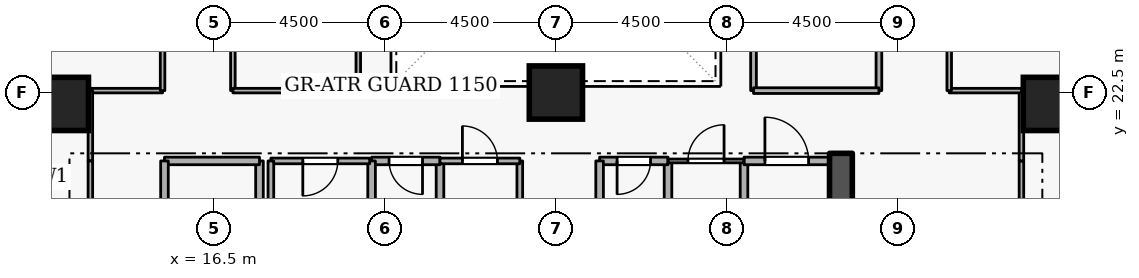
"""IFC4 building model, lengths in metres.
Left out: names, types, materials, properties, quantities, classifications, styles, units other than length and angle.
Written with IfcOpenShell. Run it as: python <this file> out.ifc"""

import sys

from ifc_helpers import new_model, si_unit, direction, frame, frame_2d, origin, origin_2d, place, context, subcontext, project, spatial, rectangle, extrude, element, fill, save


model = new_model("IFC4")
c1 = context("Model", 3, precision=1e-05, world=origin(), true_north=direction((0.0, 1.0)))
c2 = subcontext(c1, "Body", "Model", "MODEL_VIEW")
j1 = project(units=[si_unit("LENGTHUNIT", "METRE"), si_unit("PLANEANGLEUNIT", "RADIAN")], contexts=[c1])
p1 = place(None, origin())
s1 = spatial("IfcSite", under=j1, at=p1, CompositionType="ELEMENT")
p2 = place(p1, origin())
s2 = spatial("IfcBuilding", under=s1, at=p2, CompositionType="ELEMENT")
p3 = place(p2, frame((0.0, 0.0, 45.9)))
s3 = spatial("IfcBuildingStorey", under=s2, at=p3, CompositionType="ELEMENT", Elevation=45.9)
p4 = place(p3, frame((33.0, 15.2, 0.0), z_axis=(0.0, 0.0, 1.0), x_axis=(0.0, 1.0, 0.0)))
e1 = element("IfcWall", 1, at=p4, inside=s3, PredefinedType="SHEAR", context=c2, shape_type="SweptSolid", body=[
    extrude(rectangle(XDim=5.7, YDim=0.6, at=frame_2d((2.85, 0.0))), origin(), (0.0, 0.0, 1.0), 3.6),
])
for number, where, z_axis, x_axis in (
    (2, (12.5, 22.2, 0.0), (0.0, 0.0, 1.0), (1.0, 0.0, 0.0)),
    (3, (38.5, 22.2, 0.0), (0.0, 0.0, 1.0), (1.0, 0.0, 0.0)),
    (4, (25.5, 22.5, 0.0), (0.0, 0.0, 1.0), (1.0, 0.0, 0.0)),
):
    element("IfcColumn", number, at=place(p3, frame(where, z_axis=z_axis, x_axis=x_axis)), inside=s3, PredefinedType="COLUMN", context=c2, shape_type="SweptSolid", body=[
        extrude(rectangle(XDim=1.4, YDim=1.4, at=origin_2d()), origin(), (0.0, 0.0, 1.0), 3.6),
    ])
p5 = place(p3, frame((17.7, 18.4, 0.0), z_axis=(0.0, 0.0, 1.0), x_axis=(0.0, 1.0, 0.0)))
e5 = element("IfcWall", 5, at=p5, inside=s3, PredefinedType="STANDARD", context=c2, shape_type="SweptSolid", body=[
    extrude(rectangle(XDim=2.3, YDim=0.2, at=frame_2d((1.15, 0.0))), origin(), (0.0, 0.0, 1.0), 2.465),
])
p6 = place(p3, frame((17.7, 20.7, 0.0), z_axis=(0.0, 0.0, 1.0), x_axis=(-1.0, 0.0, 0.0)))
e6 = element("IfcWall", 6, at=p6, inside=s3, PredefinedType="STANDARD", context=c2, shape_type="SweptSolid", body=[
    extrude(rectangle(XDim=2.5, YDim=0.2, at=frame_2d((1.25, 0.0))), origin(), (0.0, 0.0, 1.0), 3.26),
])
p7 = place(p3, frame((15.2, 20.7, 0.0), z_axis=(0.0, 0.0, 1.0), x_axis=(0.0, -1.0, 0.0)))
e7 = element("IfcWall", 7, at=p7, inside=s3, PredefinedType="STANDARD", context=c2, shape_type="SweptSolid", body=[
    extrude(rectangle(XDim=5.7, YDim=0.2, at=frame_2d((2.85, 0.0))), origin(), (0.0, 0.0, 1.0), 3.26),
])
p8 = place(p7, frame((2.275, 0.0, 0.0)))
e8 = element("IfcOpeningElement", 8, at=p8, cuts=e7, PredefinedType="OPENING", context=c2, shape_type="SweptSolid", body=[
    extrude(rectangle(XDim=1.15, YDim=2.1, at=frame_2d((0.575, 1.05))), frame((0.0, 0.11, 0.0), z_axis=(0.0, -1.0, 0.0), x_axis=(1.0, 0.0, 0.0)), (0.0, 0.0, 1.0), 0.22),
])
p9 = place(p3, frame((28.45, 18.65, 0.0), z_axis=(0.0, 0.0, 1.0), x_axis=(0.0, 1.0, 0.0)))
e9 = element("IfcWall", 9, at=p9, inside=s3, PredefinedType="STANDARD", context=c2, shape_type="SweptSolid", body=[
    extrude(rectangle(XDim=2.05, YDim=0.2, at=frame_2d((1.025, 0.0))), origin(), (0.0, 0.0, 1.0), 3.26),
])
p10 = place(p3, frame((28.45, 20.7, 0.0), z_axis=(0.0, 0.0, 1.0), x_axis=(-1.0, 0.0, 0.0)))
e10 = element("IfcWall", 10, at=p10, inside=s3, PredefinedType="STANDARD", context=c2, shape_type="SweptSolid", body=[
    extrude(rectangle(XDim=1.8, YDim=0.2, at=frame_2d((0.9, 0.0))), origin(), (0.0, 0.0, 1.0), 3.26),
])
p11 = place(p10, frame((0.46, 0.0, 0.0)))
e11 = element("IfcOpeningElement", 11, at=p11, cuts=e10, PredefinedType="OPENING", context=c2, shape_type="SweptSolid", body=[
    extrude(rectangle(XDim=0.88, YDim=2.04, at=frame_2d((0.44, 1.02))), frame((0.0, 0.11, 0.0), z_axis=(0.0, -1.0, 0.0), x_axis=(1.0, 0.0, 0.0)), (0.0, 0.0, 1.0), 0.22),
])
for number, where, z_axis, x_axis in (
    (12, (26.65, 20.7, 0.0), (0.0, 0.0, 1.0), (0.0, -1.0, 0.0)),
    (13, (22.45, 18.65, 0.0), (0.0, 0.0, 1.0), (0.0, 1.0, 0.0)),
):
    element("IfcWall", number, at=place(p3, frame(where, z_axis=z_axis, x_axis=x_axis)), inside=s3, PredefinedType="STANDARD", context=c2, shape_type="SweptSolid", body=[
        extrude(rectangle(XDim=2.05, YDim=0.2, at=frame_2d((1.025, 0.0))), origin(), (0.0, 0.0, 1.0), 3.26),
    ])
p12 = place(p3, frame((22.45, 20.7, 0.0), z_axis=(0.0, 0.0, 1.0), x_axis=(-1.0, 0.0, 0.0)))
e14 = element("IfcWall", 14, at=p12, inside=s3, PredefinedType="STANDARD", context=c2, shape_type="SweptSolid", body=[
    extrude(rectangle(XDim=1.8, YDim=0.2, at=frame_2d((0.9, 0.0))), origin(), (0.0, 0.0, 1.0), 3.26),
])
p13 = place(p12, frame((0.46, 0.0, 0.0)))
e15 = element("IfcOpeningElement", 15, at=p13, cuts=e14, PredefinedType="OPENING", context=c2, shape_type="SweptSolid", body=[
    extrude(rectangle(XDim=0.88, YDim=2.04, at=frame_2d((0.44, 1.02))), frame((0.0, 0.11, 0.0), z_axis=(0.0, -1.0, 0.0), x_axis=(1.0, 0.0, 0.0)), (0.0, 0.0, 1.0), 0.22),
])
for number, where, z_axis, x_axis in (
    (16, (20.65, 20.7, 0.0), (0.0, 0.0, 1.0), (0.0, -1.0, 0.0)),
    (17, (30.45, 18.65, 0.0), (0.0, 0.0, 1.0), (0.0, 1.0, 0.0)),
):
    element("IfcWall", number, at=place(p3, frame(where, z_axis=z_axis, x_axis=x_axis)), inside=s3, PredefinedType="STANDARD", context=c2, shape_type="SweptSolid", body=[
        extrude(rectangle(XDim=2.05, YDim=0.2, at=frame_2d((1.025, 0.0))), origin(), (0.0, 0.0, 1.0), 3.26),
    ])
p14 = place(p3, frame((30.45, 20.7, 0.0), z_axis=(0.0, 0.0, 1.0), x_axis=(1.0, 0.0, 0.0)))
e18 = element("IfcWall", 18, at=p14, inside=s3, PredefinedType="STANDARD", context=c2, shape_type="SweptSolid", body=[
    extrude(rectangle(XDim=2.25, YDim=0.2, at=frame_2d((1.125, 0.0))), origin(), (0.0, 0.0, 1.0), 3.26),
])
p15 = place(p14, frame((0.55, 0.0, 0.0)))
e19 = element("IfcOpeningElement", 19, at=p15, cuts=e18, PredefinedType="OPENING", context=c2, shape_type="SweptSolid", body=[
    extrude(rectangle(XDim=1.15, YDim=2.1, at=frame_2d((0.575, 1.05))), frame((0.0, 0.11, 0.0), z_axis=(0.0, -1.0, 0.0), x_axis=(1.0, 0.0, 0.0)), (0.0, 0.0, 1.0), 0.22),
])
p16 = place(p3, frame((20.6, 20.7, 0.0), z_axis=(0.0, 0.0, 1.0), x_axis=(-1.0, 0.0, 0.0)))
e20 = element("IfcWall", 20, at=p16, inside=s3, PredefinedType="PARTITIONING", context=c2, shape_type="SweptSolid", body=[
    extrude(rectangle(XDim=2.6, YDim=0.15, at=frame_2d((1.3, 0.0))), origin(), (0.0, 0.0, 1.0), 3.26),
])
p17 = place(p16, frame((0.84, 0.0, 0.0)))
e21 = element("IfcOpeningElement", 21, at=p17, cuts=e20, PredefinedType="OPENING", context=c2, shape_type="SweptSolid", body=[
    extrude(rectangle(XDim=0.92, YDim=2.08, at=frame_2d((0.46, 1.04))), frame((0.0, 0.085, 0.0), z_axis=(0.0, -1.0, 0.0), x_axis=(1.0, 0.0, 0.0)), (0.0, 0.0, 1.0), 0.17),
])
p18 = place(p3, frame((18.0, 20.7, 0.0), z_axis=(0.0, 0.0, 1.0), x_axis=(0.0, -1.0, 0.0)))
e22 = element("IfcWall", 22, at=p18, inside=s3, PredefinedType="PARTITIONING", context=c2, shape_type="SweptSolid", body=[
    extrude(rectangle(XDim=2.05, YDim=0.15, at=frame_2d((1.025, 0.0))), origin(), (0.0, 0.0, 1.0), 2.465),
])
p19 = place(p3, frame((24.55, 20.7, 0.0), z_axis=(0.0, 0.0, 1.0), x_axis=(0.0, -1.0, 0.0)))
e23 = element("IfcWall", 23, at=p19, inside=s3, PredefinedType="PARTITIONING", context=c2, shape_type="SweptSolid", body=[
    extrude(rectangle(XDim=2.05, YDim=0.15, at=frame_2d((1.025, 0.0))), origin(), (0.0, 0.0, 1.0), 3.26),
])
p20 = place(p3, frame((22.45, 20.7, 0.0), z_axis=(0.0, 0.0, 1.0), x_axis=(1.0, 0.0, 0.0)))
e24 = element("IfcWall", 24, at=p20, inside=s3, PredefinedType="PARTITIONING", context=c2, shape_type="SweptSolid", body=[
    extrude(rectangle(XDim=2.1, YDim=0.15, at=frame_2d((1.05, 0.0))), origin(), (0.0, 0.0, 1.0), 3.26),
])
p21 = place(p20, frame((0.59, 0.0, 0.0)))
e25 = element("IfcOpeningElement", 25, at=p21, cuts=e24, PredefinedType="OPENING", context=c2, shape_type="SweptSolid", body=[
    extrude(rectangle(XDim=0.92, YDim=2.08, at=frame_2d((0.46, 1.04))), frame((0.0, 0.085, 0.0), z_axis=(0.0, -1.0, 0.0), x_axis=(1.0, 0.0, 0.0)), (0.0, 0.0, 1.0), 0.17),
])
p22 = place(p3, frame((28.45, 20.7, 0.0), z_axis=(0.0, 0.0, 1.0), x_axis=(1.0, 0.0, 0.0)))
e26 = element("IfcWall", 26, at=p22, inside=s3, PredefinedType="PARTITIONING", context=c2, shape_type="SweptSolid", body=[
    extrude(rectangle(XDim=2.0, YDim=0.1, at=frame_2d((1.0, 0.0))), origin(), (0.0, 0.0, 1.0), 3.26),
])
p23 = place(p22, frame((0.525, 0.0, 0.0)))
e27 = element("IfcOpeningElement", 27, at=p23, cuts=e26, PredefinedType="OPENING", context=c2, shape_type="SweptSolid", body=[
    extrude(rectangle(XDim=0.95, YDim=2.1, at=frame_2d((0.475, 1.05))), frame((0.0, 0.06, 0.0), z_axis=(0.0, -1.0, 0.0), x_axis=(1.0, 0.0, 0.0)), (0.0, 0.0, 1.0), 0.12),
])
p24 = place(p3, frame((15.15, 22.55, 0.0), z_axis=(0.0, 0.0, 1.0), x_axis=(-1.0, 0.0, 0.0)))
e28 = element("IfcWall", 28, at=p24, inside=s3, PredefinedType="PARTITIONING", context=c2, shape_type="SweptSolid", body=[
    extrude(rectangle(XDim=1.9, YDim=0.12, at=frame_2d((0.95, 0.0))), origin(), (0.0, 0.0, 1.0), 3.26),
])
p25 = place(p3, frame((13.25, 22.55, 0.0), z_axis=(0.0, 0.0, 1.0), x_axis=(0.0, -1.0, 0.0)))
e29 = element("IfcWall", 29, at=p25, inside=s3, PredefinedType="PARTITIONING", context=c2, shape_type="SweptSolid", body=[
    extrude(rectangle(XDim=1.85, YDim=0.12, at=frame_2d((0.925, 0.0))), origin(), (0.0, 0.0, 1.0), 3.26),
])
p26 = place(p3, frame((13.25, 20.7, 0.0), z_axis=(0.0, 0.0, 1.0), x_axis=(0.0, -1.0, 0.0)))
e30 = element("IfcWall", 30, at=p26, inside=s3, PredefinedType="PARTITIONING", context=c2, shape_type="SweptSolid", body=[
    extrude(rectangle(XDim=9.35, YDim=0.12, at=frame_2d((4.675, 0.0))), origin(), (0.0, 0.0, 1.0), 3.26),
])
p27 = place(p26, frame((4.15, 0.0, 0.0)))
e31 = element("IfcOpeningElement", 31, at=p27, cuts=e30, PredefinedType="OPENING", context=c2, shape_type="SweptSolid", body=[
    extrude(rectangle(XDim=1.05, YDim=2.1, at=frame_2d((0.525, 1.05))), frame((0.0, 0.07, 0.0), z_axis=(0.0, -1.0, 0.0), x_axis=(1.0, 0.0, 0.0)), (0.0, 0.0, 1.0), 0.14),
])
p28 = place(p3, frame((15.15, 27.0, 0.0), z_axis=(0.0, 0.0, 1.0), x_axis=(0.0, -1.0, 0.0)))
e32 = element("IfcWall", 32, at=p28, inside=s3, PredefinedType="PARTITIONING", context=c2, shape_type="SweptSolid", body=[
    extrude(rectangle(XDim=4.45, YDim=0.12, at=frame_2d((2.225, 0.0))), origin(), (0.0, 0.0, 1.0), 3.26),
])
p29 = place(p3, frame((37.75, 17.55, 0.0), z_axis=(0.0, 0.0, 1.0), x_axis=(0.0, 1.0, 0.0)))
e33 = element("IfcWall", 33, at=p29, inside=s3, PredefinedType="PARTITIONING", context=c2, shape_type="SweptSolid", body=[
    extrude(rectangle(XDim=3.15, YDim=0.12, at=frame_2d((1.575, 0.0))), origin(), (0.0, 0.0, 1.0), 3.26),
])
p30 = place(p3, frame((37.75, 20.7, 0.0), z_axis=(0.0, 0.0, 1.0), x_axis=(0.0, 1.0, 0.0)))
e34 = element("IfcWall", 34, at=p30, inside=s3, PredefinedType="PARTITIONING", context=c2, shape_type="SweptSolid", body=[
    extrude(rectangle(XDim=1.85, YDim=0.12, at=frame_2d((0.925, 0.0))), origin(), (0.0, 0.0, 1.0), 3.26),
])
p31 = place(p3, frame((37.75, 22.55, 0.0), z_axis=(0.0, 0.0, 1.0), x_axis=(-1.0, 0.0, 0.0)))
e35 = element("IfcWall", 35, at=p31, inside=s3, PredefinedType="PARTITIONING", context=c2, shape_type="SweptSolid", body=[
    extrude(rectangle(XDim=1.9, YDim=0.12, at=frame_2d((0.95, 0.0))), origin(), (0.0, 0.0, 1.0), 3.26),
])
p32 = place(p3, frame((35.85, 22.55, 0.0), z_axis=(0.0, 0.0, 1.0), x_axis=(0.0, 1.0, 0.0)))
e36 = element("IfcWall", 36, at=p32, inside=s3, PredefinedType="PARTITIONING", context=c2, shape_type="SweptSolid", body=[
    extrude(rectangle(XDim=4.45, YDim=0.12, at=frame_2d((2.225, 0.0))), origin(), (0.0, 0.0, 1.0), 3.26),
])
p33 = place(p32, frame((1.7, 0.0, 0.0)))
e37 = element("IfcOpeningElement", 37, at=p33, cuts=e36, PredefinedType="OPENING", context=c2, shape_type="SweptSolid", body=[
    extrude(rectangle(XDim=1.05, YDim=2.1, at=frame_2d((0.525, 1.05))), frame((0.0, 0.07, 0.0), z_axis=(0.0, -1.0, 0.0), x_axis=(1.0, 0.0, 0.0)), (0.0, 0.0, 1.0), 0.14),
])
p34 = place(p3, frame((30.7, 22.55, 0.0), z_axis=(0.0, 0.0, 1.0), x_axis=(0.0, 1.0, 0.0)))
e38 = element("IfcWall", 38, at=p34, inside=s3, PredefinedType="PARTITIONING", context=c2, shape_type="SweptSolid", body=[
    extrude(rectangle(XDim=8.9, YDim=0.15, at=frame_2d((4.45, 0.0))), origin(), (0.0, 0.0, 1.0), 3.26),
])
p35 = place(p3, frame((34.0, 31.45, 0.0), z_axis=(0.0, 0.0, 1.0), x_axis=(0.0, -1.0, 0.0)))
e39 = element("IfcWall", 39, at=p35, inside=s3, PredefinedType="PARTITIONING", context=c2, shape_type="SweptSolid", body=[
    extrude(rectangle(XDim=8.9, YDim=0.15, at=frame_2d((4.45, 0.0))), origin(), (0.0, 0.0, 1.0), 3.26),
])
p36 = place(p35, frame((2.48, 0.0, 0.0)))
e40 = element("IfcOpeningElement", 40, at=p36, cuts=e39, PredefinedType="OPENING", context=c2, shape_type="SweptSolid", body=[
    extrude(rectangle(XDim=1.3, YDim=2.12, at=frame_2d((0.65, 1.06))), frame((0.0, 0.085, 0.0), z_axis=(0.0, -1.0, 0.0), x_axis=(1.0, 0.0, 0.0)), (0.0, 0.0, 1.0), 0.17),
])
p37 = place(p3, frame((34.0, 22.55, 0.0), z_axis=(0.0, 0.0, 1.0), x_axis=(-1.0, 0.0, 0.0)))
e41 = element("IfcWall", 41, at=p37, inside=s3, PredefinedType="PARTITIONING", context=c2, shape_type="SweptSolid", body=[
    extrude(rectangle(XDim=3.3, YDim=0.15, at=frame_2d((1.65, 0.0))), origin(), (0.0, 0.0, 1.0), 3.26),
])
p38 = place(p3, frame((17.0, 22.55, 0.0), z_axis=(0.0, 0.0, 1.0), x_axis=(0.0, 1.0, 0.0)))
e42 = element("IfcWall", 42, at=p38, inside=s3, PredefinedType="PARTITIONING", context=c2, shape_type="SweptSolid", body=[
    extrude(rectangle(XDim=8.9, YDim=0.12, at=frame_2d((4.45, 0.0))), origin(), (0.0, 0.0, 1.0), 3.26),
])
p39 = place(p38, frame((3.975, 0.0, 0.0)))
e43 = element("IfcOpeningElement", 43, at=p39, cuts=e42, PredefinedType="OPENING", context=c2, shape_type="SweptSolid", body=[
    extrude(rectangle(XDim=0.95, YDim=2.1, at=frame_2d((0.475, 1.05))), frame((0.0, 0.07, 0.0), z_axis=(0.0, -1.0, 0.0), x_axis=(1.0, 0.0, 0.0)), (0.0, 0.0, 1.0), 0.14),
])
p40 = place(p3, frame((20.3, 31.45, 0.0), z_axis=(0.0, 0.0, 1.0), x_axis=(0.0, -1.0, 0.0)))
e44 = element("IfcWall", 44, at=p40, inside=s3, PredefinedType="PARTITIONING", context=c2, shape_type="SweptSolid", body=[
    extrude(rectangle(XDim=8.9, YDim=0.12, at=frame_2d((4.45, 0.0))), origin(), (0.0, 0.0, 1.0), 3.26),
])
p41 = place(p3, frame((20.3, 22.55, 0.0), z_axis=(0.0, 0.0, 1.0), x_axis=(-1.0, 0.0, 0.0)))
e45 = element("IfcWall", 45, at=p41, inside=s3, PredefinedType="PARTITIONING", context=c2, shape_type="SweptSolid", body=[
    extrude(rectangle(XDim=3.3, YDim=0.12, at=frame_2d((1.65, 0.0))), origin(), (0.0, 0.0, 1.0), 3.26),
])
p42 = place(p11, origin())
e46 = element("IfcDoor", 46, at=p42, inside=s3, OperationType="SINGLE_SWING_RIGHT", PredefinedType="DOOR", context=c2, shape_type="SweptSolid", body=[
    extrude(rectangle(XDim=0.88, YDim=2.04, at=frame_2d((0.44, 1.02))), frame((0.0, 0.025, 0.0), z_axis=(0.0, -1.0, 0.0), x_axis=(1.0, 0.0, 0.0)), (0.0, 0.0, 1.0), 0.05),
])
fill(e11, e46)
p43 = place(p13, origin())
e47 = element("IfcDoor", 47, at=p43, inside=s3, OperationType="SINGLE_SWING_LEFT", PredefinedType="DOOR", context=c2, shape_type="SweptSolid", body=[
    extrude(rectangle(XDim=0.88, YDim=2.04, at=frame_2d((0.44, 1.02))), frame((0.0, 0.025, 0.0), z_axis=(0.0, -1.0, 0.0), x_axis=(1.0, 0.0, 0.0)), (0.0, 0.0, 1.0), 0.05),
])
fill(e15, e47)
p44 = place(p17, origin())
e48 = element("IfcDoor", 48, at=p44, inside=s3, OperationType="SINGLE_SWING_RIGHT", PredefinedType="DOOR", context=c2, shape_type="SweptSolid", body=[
    extrude(rectangle(XDim=0.92, YDim=2.08, at=frame_2d((0.46, 1.04))), frame((0.0, 0.025, 0.0), z_axis=(0.0, -1.0, 0.0), x_axis=(1.0, 0.0, 0.0)), (0.0, 0.0, 1.0), 0.05),
])
fill(e21, e48)
p45 = place(p21, origin())
e49 = element("IfcDoor", 49, at=p45, inside=s3, OperationType="SINGLE_SWING_LEFT", PredefinedType="DOOR", context=c2, shape_type="SweptSolid", body=[
    extrude(rectangle(XDim=0.92, YDim=2.08, at=frame_2d((0.46, 1.04))), frame((0.0, 0.025, 0.0), z_axis=(0.0, -1.0, 0.0), x_axis=(1.0, 0.0, 0.0)), (0.0, 0.0, 1.0), 0.05),
])
fill(e25, e49)
p46 = place(p23, origin())
e50 = element("IfcDoor", 50, at=p46, inside=s3, OperationType="SINGLE_SWING_RIGHT", PredefinedType="DOOR", context=c2, shape_type="SweptSolid", body=[
    extrude(rectangle(XDim=0.95, YDim=2.1, at=frame_2d((0.475, 1.05))), frame((0.0, 0.025, 0.0), z_axis=(0.0, -1.0, 0.0), x_axis=(1.0, 0.0, 0.0)), (0.0, 0.0, 1.0), 0.05),
])
fill(e27, e50)
p47 = place(p15, origin())
e51 = element("IfcDoor", 51, at=p47, inside=s3, OperationType="SINGLE_SWING_LEFT", PredefinedType="DOOR", context=c2, shape_type="SweptSolid", body=[
    extrude(rectangle(XDim=1.15, YDim=2.1, at=frame_2d((0.575, 1.05))), frame((0.0, 0.025, 0.0), z_axis=(0.0, -1.0, 0.0), x_axis=(1.0, 0.0, 0.0)), (0.0, 0.0, 1.0), 0.05),
])
fill(e19, e51)
save(model, sys.argv[1])
